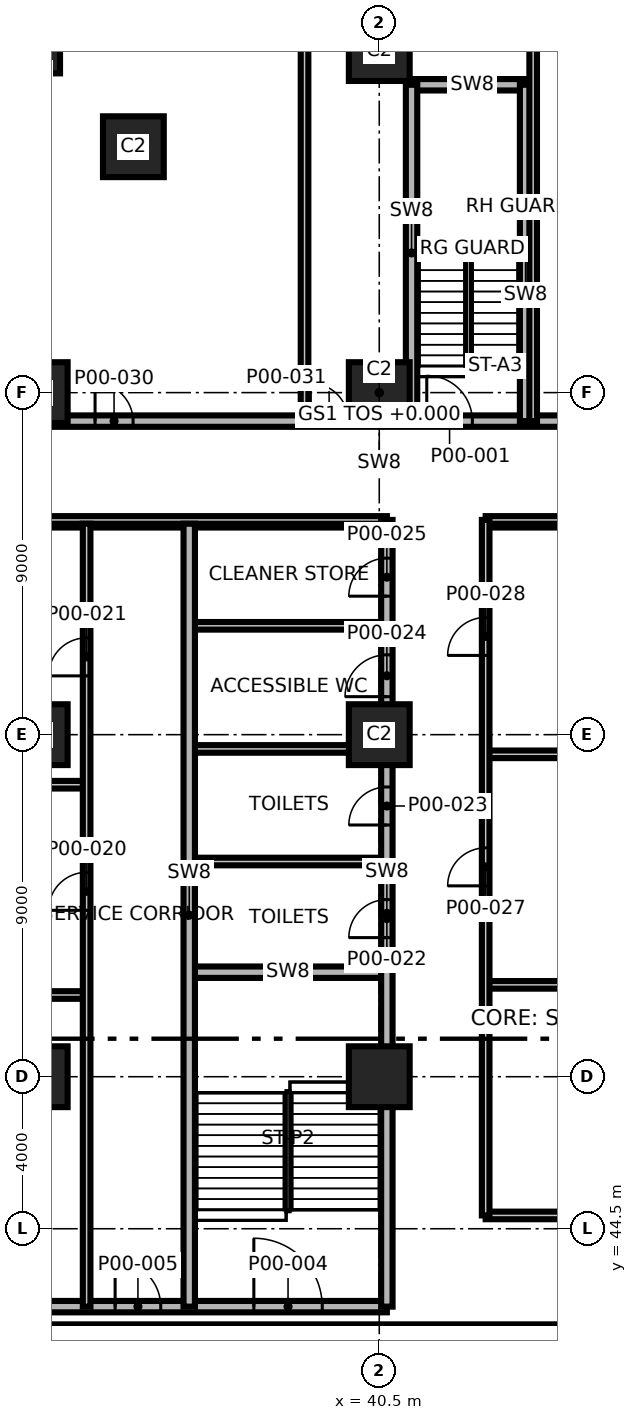
"""IFC4 building model, lengths in metres.
Left out: names, types, materials, properties, quantities, classifications, styles, units other than length and angle.
Written with IfcOpenShell. Run it as: python <this file> out.ifc"""

import sys

from ifc_helpers import new_model, si_unit, direction, frame, frame_2d, origin, origin_2d, place, context, subcontext, project, spatial, rectangle, extrude, element, fill, save


model = new_model("IFC4")
c1 = context("Model", 3, precision=1e-05, world=origin(), true_north=direction((0.0, 1.0)))
c2 = subcontext(c1, "Body", "Model", "MODEL_VIEW")
j1 = project(units=[si_unit("LENGTHUNIT", "METRE"), si_unit("PLANEANGLEUNIT", "RADIAN")], contexts=[c1])
p1 = place(None, origin())
s1 = spatial("IfcSite", under=j1, at=p1, CompositionType="ELEMENT")
p2 = place(p1, origin())
s2 = spatial("IfcBuilding", under=s1, at=p2, CompositionType="ELEMENT")
p3 = place(p2, origin())
s3 = spatial("IfcBuildingStorey", under=s2, at=p3, CompositionType="ELEMENT", Elevation=0.0)
for number, where, z_axis, x_axis in (
    (1, (31.5, 48.5, 0.0), (0.0, 0.0, 1.0), (1.0, 0.0, 0.0)),
    (2, (40.5, 48.5, 0.0), (0.0, 0.0, 1.0), (1.0, 0.0, 0.0)),
    (3, (31.5, 57.5, 0.0), (0.0, 0.0, 1.0), (1.0, 0.0, 0.0)),
    (4, (40.5, 57.5, 0.0), (0.0, 0.0, 1.0), (1.0, 0.0, 0.0)),
    (5, (31.5, 66.5, 0.0), (0.0, 0.0, 1.0), (1.0, 0.0, 0.0)),
    (6, (40.5, 66.5, 0.0), (0.0, 0.0, 1.0), (1.0, 0.0, 0.0)),
):
    element("IfcColumn", number, at=place(p3, frame(where, z_axis=z_axis, x_axis=x_axis)), inside=s3, PredefinedType="COLUMN", context=c2, shape_type="SweptSolid", body=[
        extrude(rectangle(XDim=1.6, YDim=1.6, at=origin_2d()), origin(), (0.0, 0.0, 1.0), 8.0),
    ])
p4 = place(p3, frame((31.5, 75.5, 0.0), z_axis=(0.0, 0.0, 1.0), x_axis=(1.0, 0.0, 0.0)))
e7 = element("IfcColumn", 7, at=p4, inside=s3, PredefinedType="COLUMN", context=c2, shape_type="SweptSolid", body=[
    extrude(rectangle(XDim=1.2, YDim=1.2, at=origin_2d()), origin(), (0.0, 0.0, 1.0), 8.0),
])
for number, where, z_axis, x_axis in (
    (8, (40.5, 75.5, 0.0), (0.0, 0.0, 1.0), (1.0, 0.0, 0.0)),
    (9, (34.03, 72.97, 0.0), (0.0, 0.0, 1.0), (1.0, 0.0, 0.0)),
):
    element("IfcColumn", number, at=place(p3, frame(where, z_axis=z_axis, x_axis=x_axis)), inside=s3, PredefinedType="COLUMN", context=c2, shape_type="SweptSolid", body=[
        extrude(rectangle(XDim=1.6, YDim=1.6, at=origin_2d()), origin(), (0.0, 0.0, 1.0), 8.0),
    ])
p5 = place(p3, frame((21.07, 42.45, 0.0), z_axis=(0.0, 0.0, 1.0), x_axis=(1.0, 0.0, 0.0)))
e10 = element("IfcWall", 10, at=p5, inside=s3, PredefinedType="SHEAR", context=c2, shape_type="SweptSolid", body=[
    extrude(rectangle(XDim=19.63, YDim=0.3, at=frame_2d((9.815, 0.0))), origin(), (0.0, 0.0, 1.0), 7.7),
])
p6 = place(p5, frame((16.13, 0.0, 0.0)))
e11 = element("IfcOpeningElement", 11, at=p6, cuts=e10, PredefinedType="OPENING", context=c2, shape_type="SweptSolid", body=[
    extrude(rectangle(XDim=1.8, YDim=2.1, at=frame_2d((0.9, 1.05))), frame((0.0, 0.16, 0.0), z_axis=(0.0, -1.0, 0.0), x_axis=(1.0, 0.0, 0.0)), (0.0, 0.0, 1.0), 0.32),
])
p7 = place(p5, frame((12.48, 0.0, 0.0)))
e12 = element("IfcOpeningElement", 12, at=p7, cuts=e10, PredefinedType="OPENING", context=c2, shape_type="SweptSolid", body=[
    extrude(rectangle(XDim=1.2, YDim=2.1, at=frame_2d((0.6, 1.05))), frame((0.0, 0.16, 0.0), z_axis=(0.0, -1.0, 0.0), x_axis=(1.0, 0.0, 0.0)), (0.0, 0.0, 1.0), 0.32),
])
p8 = place(p5, frame((5.33, 0.0, 0.0)))
e13 = element("IfcOpeningElement", 13, at=p8, cuts=e10, PredefinedType="OPENING", context=c2, shape_type="SweptSolid", body=[
    extrude(rectangle(XDim=1.0, YDim=2.1, at=frame_2d((0.5, 1.05))), frame((0.0, 0.16, 0.0), z_axis=(0.0, -1.0, 0.0), x_axis=(1.0, 0.0, 0.0)), (0.0, 0.0, 1.0), 0.32),
])
p9 = place(p3, frame((43.3, 44.85, 0.0), z_axis=(0.0, 0.0, 1.0), x_axis=(1.0, 0.0, 0.0)))
e14 = element("IfcWall", 14, at=p9, inside=s3, PredefinedType="PARTITIONING", context=c2, shape_type="SweptSolid", body=[
    extrude(rectangle(XDim=18.2, YDim=0.2, at=frame_2d((9.1, 0.0))), origin(), (0.0, 0.0, 1.0), 7.7),
])
p10 = place(p9, frame((5.589, 0.0, 0.0)))
e15 = element("IfcOpeningElement", 15, at=p10, cuts=e14, PredefinedType="OPENING", context=c2, shape_type="SweptSolid", body=[
    extrude(rectangle(XDim=1.0, YDim=2.1, at=frame_2d((0.5, 1.05))), frame((0.0, 0.11, 0.0), z_axis=(0.0, -1.0, 0.0), x_axis=(1.0, 0.0, 0.0)), (0.0, 0.0, 1.0), 0.22),
])
p11 = place(p3, frame((21.07, 50.65, 0.0), z_axis=(0.0, 0.0, 1.0), x_axis=(1.0, 0.0, 0.0)))
e16 = element("IfcWall", 16, at=p11, inside=s3, PredefinedType="PARTITIONING", context=c2, shape_type="SweptSolid", body=[
    extrude(rectangle(XDim=11.73, YDim=0.2, at=frame_2d((5.865, 0.0))), origin(), (0.0, 0.0, 1.0), 6.8),
])
p12 = place(p3, frame((43.3, 50.917, 0.0), z_axis=(0.0, 0.0, 1.0), x_axis=(1.0, 0.0, 0.0)))
e17 = element("IfcWall", 17, at=p12, inside=s3, PredefinedType="PARTITIONING", context=c2, shape_type="SweptSolid", body=[
    extrude(rectangle(XDim=17.972, YDim=0.2, at=frame_2d((8.986, 0.0))), origin(), (0.0, 0.0, 1.0), 6.8),
])
p13 = place(p3, frame((35.5, 51.25, 0.0), z_axis=(0.0, 0.0, 1.0), x_axis=(1.0, 0.0, 0.0)))
e18 = element("IfcWall", 18, at=p13, inside=s3, PredefinedType="SHEAR", context=c2, shape_type="SweptSolid", body=[
    extrude(rectangle(XDim=5.2, YDim=0.3, at=frame_2d((2.6, 0.0))), origin(), (0.0, 0.0, 1.0), 7.7),
])
p14 = place(p3, frame((35.55, 54.162, 0.0), z_axis=(0.0, 0.0, 1.0), x_axis=(1.0, 0.0, 0.0)))
e19 = element("IfcWall", 19, at=p14, inside=s3, PredefinedType="PARTITIONING", context=c2, shape_type="SweptSolid", body=[
    extrude(rectangle(XDim=5.15, YDim=0.2, at=frame_2d((2.575, 0.0))), origin(), (0.0, 0.0, 1.0), 7.7),
])
p15 = place(p3, frame((21.07, 56.183, 0.0), z_axis=(0.0, 0.0, 1.0), x_axis=(1.0, 0.0, 0.0)))
e20 = element("IfcWall", 20, at=p15, inside=s3, PredefinedType="PARTITIONING", context=c2, shape_type="SweptSolid", body=[
    extrude(rectangle(XDim=11.73, YDim=0.2, at=frame_2d((5.865, 0.0))), origin(), (0.0, 0.0, 1.0), 6.8),
])
p16 = place(p3, frame((43.3, 56.983, 0.0), z_axis=(0.0, 0.0, 1.0), x_axis=(1.0, 0.0, 0.0)))
e21 = element("IfcWall", 21, at=p16, inside=s3, PredefinedType="PARTITIONING", context=c2, shape_type="SweptSolid", body=[
    extrude(rectangle(XDim=16.63, YDim=0.2, at=frame_2d((8.315, 0.0))), origin(), (0.0, 0.0, 1.0), 6.8),
])
for number, where, z_axis, x_axis in (
    (22, (35.55, 57.125, 0.0), (0.0, 0.0, 1.0), (1.0, 0.0, 0.0)),
    (23, (35.55, 60.364, 0.0), (0.0, 0.0, 1.0), (1.0, 0.0, 0.0)),
):
    element("IfcWall", number, at=place(p3, frame(where, z_axis=z_axis, x_axis=x_axis)), inside=s3, PredefinedType="PARTITIONING", context=c2, shape_type="SweptSolid", body=[
        extrude(rectangle(XDim=5.15, YDim=0.2, at=frame_2d((2.575, 0.0))), origin(), (0.0, 0.0, 1.0), 7.7),
    ])
p17 = place(p3, frame((21.07, 63.05, 0.0), z_axis=(0.0, 0.0, 1.0), x_axis=(1.0, 0.0, 0.0)))
e24 = element("IfcWall", 24, at=p17, inside=s3, PredefinedType="PARTITIONING", context=c2, shape_type="SweptSolid", body=[
    extrude(rectangle(XDim=14.43, YDim=0.2, at=frame_2d((7.215, 0.0))), origin(), (0.0, 0.0, 1.0), 6.8),
])
p18 = place(p3, frame((35.55, 63.05, 0.0), z_axis=(0.0, 0.0, 1.0), x_axis=(1.0, 0.0, 0.0)))
e25 = element("IfcWall", 25, at=p18, inside=s3, PredefinedType="PARTITIONING", context=c2, shape_type="SweptSolid", body=[
    extrude(rectangle(XDim=5.15, YDim=0.2, at=frame_2d((2.575, 0.0))), origin(), (0.0, 0.0, 1.0), 7.7),
])
p19 = place(p3, frame((43.3, 63.05, 0.0), z_axis=(0.0, 0.0, 1.0), x_axis=(1.0, 0.0, 0.0)))
e26 = element("IfcWall", 26, at=p19, inside=s3, PredefinedType="PARTITIONING", context=c2, shape_type="SweptSolid", body=[
    extrude(rectangle(XDim=16.63, YDim=0.2, at=frame_2d((8.315, 0.0))), origin(), (0.0, 0.0, 1.0), 6.8),
])
p20 = place(p3, frame((21.07, 63.15, 0.0), z_axis=(0.0, 0.0, 1.0), x_axis=(1.0, 0.0, 0.0)))
e27 = element("IfcWall", 27, at=p20, inside=s3, PredefinedType="PARTITIONING", context=c2, shape_type="SweptSolid", body=[
    extrude(rectangle(XDim=19.63, YDim=0.2, at=frame_2d((9.815, 0.0))), origin(), (0.0, 0.0, 1.0), 6.8),
])
p21 = place(p3, frame((43.3, 63.15, 0.0), z_axis=(0.0, 0.0, 1.0), x_axis=(1.0, 0.0, 0.0)))
e28 = element("IfcWall", 28, at=p21, inside=s3, PredefinedType="PARTITIONING", context=c2, shape_type="SweptSolid", body=[
    extrude(rectangle(XDim=16.63, YDim=0.2, at=frame_2d((8.315, 0.0))), origin(), (0.0, 0.0, 1.0), 6.8),
])
p22 = place(p3, frame((21.07, 65.75, 0.0), z_axis=(0.0, 0.0, 1.0), x_axis=(1.0, 0.0, 0.0)))
e29 = element("IfcWall", 29, at=p22, inside=s3, PredefinedType="SHEAR", context=c2, shape_type="SweptSolid", body=[
    extrude(rectangle(XDim=38.86, YDim=0.3, at=frame_2d((19.43, 0.0))), origin(), (0.0, 0.0, 1.0), 7.7),
])
p23 = place(p22, frame((20.68, 0.0, 0.0)))
e30 = element("IfcOpeningElement", 30, at=p23, cuts=e29, PredefinedType="OPENING", context=c2, shape_type="SweptSolid", body=[
    extrude(rectangle(XDim=1.2, YDim=2.1, at=frame_2d((0.6, 1.05))), frame((0.0, 0.16, 0.0), z_axis=(0.0, -1.0, 0.0), x_axis=(1.0, 0.0, 0.0)), (0.0, 0.0, 1.0), 0.32),
])
p24 = place(p22, frame((3.186, 0.0, 0.0)))
e31 = element("IfcOpeningElement", 31, at=p24, cuts=e29, PredefinedType="OPENING", context=c2, shape_type="SweptSolid", body=[
    extrude(rectangle(XDim=1.0, YDim=2.1, at=frame_2d((0.5, 1.05))), frame((0.0, 0.16, 0.0), z_axis=(0.0, -1.0, 0.0), x_axis=(1.0, 0.0, 0.0)), (0.0, 0.0, 1.0), 0.32),
])
p25 = place(p22, frame((11.952, 0.0, 0.0)))
e32 = element("IfcOpeningElement", 32, at=p25, cuts=e29, PredefinedType="OPENING", context=c2, shape_type="SweptSolid", body=[
    extrude(rectangle(XDim=1.0, YDim=2.1, at=frame_2d((0.5, 1.05))), frame((0.0, 0.16, 0.0), z_axis=(0.0, -1.0, 0.0), x_axis=(1.0, 0.0, 0.0)), (0.0, 0.0, 1.0), 0.32),
])
p26 = place(p22, frame((17.615, 0.0, 0.0)))
e33 = element("IfcOpeningElement", 33, at=p26, cuts=e29, PredefinedType="OPENING", context=c2, shape_type="SweptSolid", body=[
    extrude(rectangle(XDim=1.0, YDim=2.1, at=frame_2d((0.5, 1.05))), frame((0.0, 0.16, 0.0), z_axis=(0.0, -1.0, 0.0), x_axis=(1.0, 0.0, 0.0)), (0.0, 0.0, 1.0), 0.32),
])
p27 = place(p22, frame((26.43, 0.0, 0.0)))
e34 = element("IfcOpeningElement", 34, at=p27, cuts=e29, PredefinedType="OPENING", context=c2, shape_type="SweptSolid", body=[
    extrude(rectangle(XDim=1.0, YDim=2.1, at=frame_2d((0.5, 1.05))), frame((0.0, 0.16, 0.0), z_axis=(0.0, -1.0, 0.0), x_axis=(1.0, 0.0, 0.0)), (0.0, 0.0, 1.0), 0.32),
])
p28 = place(p22, frame((35.18, 0.0, 0.0)))
e35 = element("IfcOpeningElement", 35, at=p28, cuts=e29, PredefinedType="OPENING", context=c2, shape_type="SweptSolid", body=[
    extrude(rectangle(XDim=1.0, YDim=2.1, at=frame_2d((0.5, 1.05))), frame((0.0, 0.16, 0.0), z_axis=(0.0, -1.0, 0.0), x_axis=(1.0, 0.0, 0.0)), (0.0, 0.0, 1.0), 0.32),
])
p29 = place(p3, frame((41.35, 74.6, 0.0), z_axis=(0.0, 0.0, 1.0), x_axis=(1.0, 0.0, 0.0)))
e36 = element("IfcWall", 36, at=p29, inside=s3, PredefinedType="SHEAR", context=c2, shape_type="SweptSolid", body=[
    extrude(rectangle(XDim=3.2, YDim=0.3, at=frame_2d((1.6, 0.0))), origin(), (0.0, 0.0, 1.0), 7.7),
])
p30 = place(p3, frame((32.8, 42.45, 0.0), z_axis=(0.0, 0.0, 1.0), x_axis=(0.0, 1.0, 0.0)))
e37 = element("IfcWall", 37, at=p30, inside=s3, PredefinedType="PARTITIONING", context=c2, shape_type="SweptSolid", body=[
    extrude(rectangle(XDim=20.6, YDim=0.2, at=frame_2d((10.3, 0.0))), origin(), (0.0, 0.0, 1.0), 7.7),
])
p31 = place(p30, frame((10.428, 0.0, 0.0)))
e38 = element("IfcOpeningElement", 38, at=p31, cuts=e37, PredefinedType="OPENING", context=c2, shape_type="SweptSolid", body=[
    extrude(rectangle(XDim=1.0, YDim=2.1, at=frame_2d((0.5, 1.05))), frame((0.0, 0.11, 0.0), z_axis=(0.0, -1.0, 0.0), x_axis=(1.0, 0.0, 0.0)), (0.0, 0.0, 1.0), 0.22),
])
p32 = place(p30, frame((16.597, 0.0, 0.0)))
e39 = element("IfcOpeningElement", 39, at=p32, cuts=e37, PredefinedType="OPENING", context=c2, shape_type="SweptSolid", body=[
    extrude(rectangle(XDim=1.0, YDim=2.1, at=frame_2d((0.5, 1.05))), frame((0.0, 0.11, 0.0), z_axis=(0.0, -1.0, 0.0), x_axis=(1.0, 0.0, 0.0)), (0.0, 0.0, 1.0), 0.22),
])
p33 = place(p3, frame((35.5, 42.45, 0.0), z_axis=(0.0, 0.0, 1.0), x_axis=(0.0, 1.0, 0.0)))
e40 = element("IfcWall", 40, at=p33, inside=s3, PredefinedType="SHEAR", context=c2, shape_type="SweptSolid", body=[
    extrude(rectangle(XDim=20.6, YDim=0.3, at=frame_2d((10.3, 0.0))), origin(), (0.0, 0.0, 1.0), 7.7),
])
p34 = place(p3, frame((38.534, 65.75, 0.0), z_axis=(0.0, 0.0, 1.0), x_axis=(0.0, 1.0, 0.0)))
e41 = element("IfcWall", 41, at=p34, inside=s3, PredefinedType="PARTITIONING", context=c2, shape_type="SweptSolid", body=[
    extrude(rectangle(XDim=20.18, YDim=0.2, at=frame_2d((10.09, 0.0))), origin(), (0.0, 0.0, 1.0), 6.8),
])
p35 = place(p3, frame((40.7, 42.45, 0.0), z_axis=(0.0, 0.0, 1.0), x_axis=(0.0, 1.0, 0.0)))
e42 = element("IfcWall", 42, at=p35, inside=s3, PredefinedType="SHEAR", context=c2, shape_type="SweptSolid", body=[
    extrude(rectangle(XDim=20.7, YDim=0.3, at=frame_2d((10.35, 0.0))), origin(), (0.0, 0.0, 1.0), 7.7),
])
p36 = place(p35, frame((9.71, 0.0, 0.0)))
e43 = element("IfcOpeningElement", 43, at=p36, cuts=e42, PredefinedType="OPENING", context=c2, shape_type="SweptSolid", body=[
    extrude(rectangle(XDim=1.0, YDim=2.1, at=frame_2d((0.5, 1.05))), frame((0.0, 0.16, 0.0), z_axis=(0.0, -1.0, 0.0), x_axis=(1.0, 0.0, 0.0)), (0.0, 0.0, 1.0), 0.32),
])
p37 = place(p35, frame((12.673, 0.0, 0.0)))
e44 = element("IfcOpeningElement", 44, at=p37, cuts=e42, PredefinedType="OPENING", context=c2, shape_type="SweptSolid", body=[
    extrude(rectangle(XDim=1.0, YDim=2.1, at=frame_2d((0.5, 1.05))), frame((0.0, 0.16, 0.0), z_axis=(0.0, -1.0, 0.0), x_axis=(1.0, 0.0, 0.0)), (0.0, 0.0, 1.0), 0.32),
])
p38 = place(p35, frame((16.05, 0.0, 0.0)))
e45 = element("IfcOpeningElement", 45, at=p38, cuts=e42, PredefinedType="OPENING", context=c2, shape_type="SweptSolid", body=[
    extrude(rectangle(XDim=1.1, YDim=2.1, at=frame_2d((0.55, 1.05))), frame((0.0, 0.16, 0.0), z_axis=(0.0, -1.0, 0.0), x_axis=(1.0, 0.0, 0.0)), (0.0, 0.0, 1.0), 0.32),
])
p39 = place(p35, frame((18.694, 0.0, 0.0)))
e46 = element("IfcOpeningElement", 46, at=p39, cuts=e42, PredefinedType="OPENING", context=c2, shape_type="SweptSolid", body=[
    extrude(rectangle(XDim=1.0, YDim=2.1, at=frame_2d((0.5, 1.05))), frame((0.0, 0.16, 0.0), z_axis=(0.0, -1.0, 0.0), x_axis=(1.0, 0.0, 0.0)), (0.0, 0.0, 1.0), 0.32),
])
p40 = place(p3, frame((41.35, 65.75, 0.0), z_axis=(0.0, 0.0, 1.0), x_axis=(0.0, 1.0, 0.0)))
e47 = element("IfcWall", 47, at=p40, inside=s3, PredefinedType="SHEAR", context=c2, shape_type="SweptSolid", body=[
    extrude(rectangle(XDim=8.85, YDim=0.3, at=frame_2d((4.425, 0.0))), origin(), (0.0, 0.0, 1.0), 7.7),
])
p41 = place(p3, frame((43.3, 44.85, 0.0), z_axis=(0.0, 0.0, 1.0), x_axis=(0.0, 1.0, 0.0)))
e48 = element("IfcWall", 48, at=p41, inside=s3, PredefinedType="PARTITIONING", context=c2, shape_type="SweptSolid", body=[
    extrude(rectangle(XDim=18.3, YDim=0.2, at=frame_2d((9.15, 0.0))), origin(), (0.0, 0.0, 1.0), 7.7),
])
p42 = place(p41, frame((8.672, 0.0, 0.0)))
e49 = element("IfcOpeningElement", 49, at=p42, cuts=e48, PredefinedType="OPENING", context=c2, shape_type="SweptSolid", body=[
    extrude(rectangle(XDim=1.0, YDim=2.1, at=frame_2d((0.5, 1.05))), frame((0.0, 0.11, 0.0), z_axis=(0.0, -1.0, 0.0), x_axis=(1.0, 0.0, 0.0)), (0.0, 0.0, 1.0), 0.22),
])
p43 = place(p41, frame((14.735, 0.0, 0.0)))
e50 = element("IfcOpeningElement", 50, at=p43, cuts=e48, PredefinedType="OPENING", context=c2, shape_type="SweptSolid", body=[
    extrude(rectangle(XDim=1.0, YDim=2.1, at=frame_2d((0.5, 1.05))), frame((0.0, 0.11, 0.0), z_axis=(0.0, -1.0, 0.0), x_axis=(1.0, 0.0, 0.0)), (0.0, 0.0, 1.0), 0.22),
])
p44 = place(p3, frame((44.35, 65.75, 0.0), z_axis=(0.0, 0.0, 1.0), x_axis=(0.0, 1.0, 0.0)))
e51 = element("IfcWall", 51, at=p44, inside=s3, PredefinedType="SHEAR", context=c2, shape_type="SweptSolid", body=[
    extrude(rectangle(XDim=8.85, YDim=0.3, at=frame_2d((4.425, 0.0))), origin(), (0.0, 0.0, 1.0), 7.7),
])
p45 = place(p3, frame((44.55, 65.75, 0.0), z_axis=(0.0, 0.0, 1.0), x_axis=(0.0, 1.0, 0.0)))
e52 = element("IfcWall", 52, at=p45, inside=s3, PredefinedType="PARTITIONING", context=c2, shape_type="SweptSolid", body=[
    extrude(rectangle(XDim=20.18, YDim=0.2, at=frame_2d((10.09, 0.0))), origin(), (0.0, 0.0, 1.0), 6.8),
])
p46 = place(p23, origin())
e53 = element("IfcDoor", 53, at=p46, inside=s3, OperationType="SINGLE_SWING_LEFT", PredefinedType="DOOR", context=c2, shape_type="SweptSolid", body=[
    extrude(rectangle(XDim=1.2, YDim=2.1, at=frame_2d((0.6, 1.05))), frame((0.0, 0.025, 0.0), z_axis=(0.0, -1.0, 0.0), x_axis=(1.0, 0.0, 0.0)), (0.0, 0.0, 1.0), 0.05),
])
fill(e30, e53)
p47 = place(p6, origin())
e54 = element("IfcDoor", 54, at=p47, inside=s3, OperationType="SINGLE_SWING_RIGHT", PredefinedType="DOOR", context=c2, shape_type="SweptSolid", body=[
    extrude(rectangle(XDim=1.8, YDim=2.1, at=frame_2d((0.9, 1.05))), frame((0.0, 0.025, 0.0), z_axis=(0.0, -1.0, 0.0), x_axis=(1.0, 0.0, 0.0)), (0.0, 0.0, 1.0), 0.05),
])
fill(e11, e54)
p48 = place(p7, origin())
e55 = element("IfcDoor", 55, at=p48, inside=s3, OperationType="SINGLE_SWING_LEFT", PredefinedType="DOOR", context=c2, shape_type="SweptSolid", body=[
    extrude(rectangle(XDim=1.2, YDim=2.1, at=frame_2d((0.6, 1.05))), frame((0.0, 0.025, 0.0), z_axis=(0.0, -1.0, 0.0), x_axis=(1.0, 0.0, 0.0)), (0.0, 0.0, 1.0), 0.05),
])
fill(e12, e55)
p49 = place(p31, origin())
e56 = element("IfcDoor", 56, at=p49, inside=s3, OperationType="SINGLE_SWING_RIGHT", PredefinedType="DOOR", context=c2, shape_type="SweptSolid", body=[
    extrude(rectangle(XDim=1.0, YDim=2.1, at=frame_2d((0.5, 1.05))), frame((0.0, 0.025, 0.0), z_axis=(0.0, -1.0, 0.0), x_axis=(1.0, 0.0, 0.0)), (0.0, 0.0, 1.0), 0.05),
])
fill(e38, e56)
p50 = place(p32, origin())
e57 = element("IfcDoor", 57, at=p50, inside=s3, OperationType="SINGLE_SWING_LEFT", PredefinedType="DOOR", context=c2, shape_type="SweptSolid", body=[
    extrude(rectangle(XDim=1.0, YDim=2.1, at=frame_2d((0.5, 1.05))), frame((0.0, 0.025, 0.0), z_axis=(0.0, -1.0, 0.0), x_axis=(1.0, 0.0, 0.0)), (0.0, 0.0, 1.0), 0.05),
])
fill(e39, e57)
p51 = place(p36, origin())
e58 = element("IfcDoor", 58, at=p51, inside=s3, OperationType="SINGLE_SWING_RIGHT", PredefinedType="DOOR", context=c2, shape_type="SweptSolid", body=[
    extrude(rectangle(XDim=1.0, YDim=2.1, at=frame_2d((0.5, 1.05))), frame((0.0, 0.025, 0.0), z_axis=(0.0, -1.0, 0.0), x_axis=(1.0, 0.0, 0.0)), (0.0, 0.0, 1.0), 0.05),
])
fill(e43, e58)
p52 = place(p37, origin())
e59 = element("IfcDoor", 59, at=p52, inside=s3, OperationType="SINGLE_SWING_LEFT", PredefinedType="DOOR", context=c2, shape_type="SweptSolid", body=[
    extrude(rectangle(XDim=1.0, YDim=2.1, at=frame_2d((0.5, 1.05))), frame((0.0, 0.025, 0.0), z_axis=(0.0, -1.0, 0.0), x_axis=(1.0, 0.0, 0.0)), (0.0, 0.0, 1.0), 0.05),
])
fill(e44, e59)
p53 = place(p38, origin())
e60 = element("IfcDoor", 60, at=p53, inside=s3, OperationType="SINGLE_SWING_RIGHT", PredefinedType="DOOR", context=c2, shape_type="SweptSolid", body=[
    extrude(rectangle(XDim=1.1, YDim=2.1, at=frame_2d((0.55, 1.05))), frame((0.0, 0.025, 0.0), z_axis=(0.0, -1.0, 0.0), x_axis=(1.0, 0.0, 0.0)), (0.0, 0.0, 1.0), 0.05),
])
fill(e45, e60)
p54 = place(p39, origin())
e61 = element("IfcDoor", 61, at=p54, inside=s3, OperationType="SINGLE_SWING_LEFT", PredefinedType="DOOR", context=c2, shape_type="SweptSolid", body=[
    extrude(rectangle(XDim=1.0, YDim=2.1, at=frame_2d((0.5, 1.05))), frame((0.0, 0.025, 0.0), z_axis=(0.0, -1.0, 0.0), x_axis=(1.0, 0.0, 0.0)), (0.0, 0.0, 1.0), 0.05),
])
fill(e46, e61)
p55 = place(p42, origin())
e62 = element("IfcDoor", 62, at=p55, inside=s3, OperationType="SINGLE_SWING_LEFT", PredefinedType="DOOR", context=c2, shape_type="SweptSolid", body=[
    extrude(rectangle(XDim=1.0, YDim=2.1, at=frame_2d((0.5, 1.05))), frame((0.0, 0.025, 0.0), z_axis=(0.0, -1.0, 0.0), x_axis=(1.0, 0.0, 0.0)), (0.0, 0.0, 1.0), 0.05),
])
fill(e49, e62)
p56 = place(p43, origin())
e63 = element("IfcDoor", 63, at=p56, inside=s3, OperationType="SINGLE_SWING_RIGHT", PredefinedType="DOOR", context=c2, shape_type="SweptSolid", body=[
    extrude(rectangle(XDim=1.0, YDim=2.1, at=frame_2d((0.5, 1.05))), frame((0.0, 0.025, 0.0), z_axis=(0.0, -1.0, 0.0), x_axis=(1.0, 0.0, 0.0)), (0.0, 0.0, 1.0), 0.05),
])
fill(e50, e63)
p57 = place(p25, origin())
e64 = element("IfcDoor", 64, at=p57, inside=s3, OperationType="SINGLE_SWING_RIGHT", PredefinedType="DOOR", context=c2, shape_type="SweptSolid", body=[
    extrude(rectangle(XDim=1.0, YDim=2.1, at=frame_2d((0.5, 1.05))), frame((0.0, 0.025, 0.0), z_axis=(0.0, -1.0, 0.0), x_axis=(1.0, 0.0, 0.0)), (0.0, 0.0, 1.0), 0.05),
])
fill(e32, e64)
p58 = place(p26, origin())
e65 = element("IfcDoor", 65, at=p58, inside=s3, OperationType="SINGLE_SWING_LEFT", PredefinedType="DOOR", context=c2, shape_type="SweptSolid", body=[
    extrude(rectangle(XDim=1.0, YDim=2.1, at=frame_2d((0.5, 1.05))), frame((0.0, 0.025, 0.0), z_axis=(0.0, -1.0, 0.0), x_axis=(1.0, 0.0, 0.0)), (0.0, 0.0, 1.0), 0.05),
])
fill(e33, e65)
save(model, sys.argv[1])
